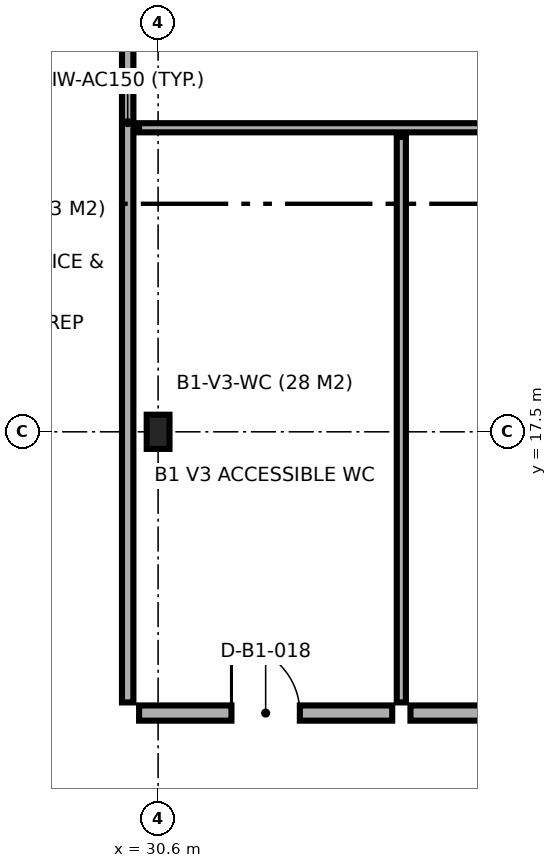
"""IFC4 building model, lengths in metres.
Left out: names, types, materials, properties, quantities, classifications, styles, units other than length and angle.
Written with IfcOpenShell. Run it as: python <this file> out.ifc"""

import sys

from ifc_helpers import new_model, si_unit, direction, frame, frame_2d, origin, origin_2d, place, context, subcontext, project, spatial, rectangle, i_section, extrude, element, fill, save


model = new_model("IFC4")
c1 = context("Model", 3, precision=1e-05, world=origin(), true_north=direction((0.0, 1.0)))
c2 = subcontext(c1, "Body", "Model", "MODEL_VIEW")
j1 = project(units=[si_unit("LENGTHUNIT", "METRE"), si_unit("PLANEANGLEUNIT", "RADIAN")], contexts=[c1])
p1 = place(None, origin())
s1 = spatial("IfcSite", under=j1, at=p1, CompositionType="ELEMENT")
p2 = place(p1, origin())
s2 = spatial("IfcBuilding", under=s1, at=p2, CompositionType="ELEMENT")
p3 = place(p2, frame((0.0, 0.0, -5.0)))
s3 = spatial("IfcBuildingStorey", under=s2, at=p3, CompositionType="ELEMENT", Elevation=-5.0)
p4 = place(p3, frame((30.6, 17.5, 0.0), z_axis=(0.0, 0.0, 1.0), x_axis=(1.0, 0.0, 0.0)))
e1 = element("IfcColumn", 1, at=p4, inside=s3, PredefinedType="COLUMN", context=c2, shape_type="SweptSolid", body=[
    extrude(i_section(OverallWidth=0.3, OverallDepth=0.45, WebThickness=0.014, FlangeThickness=0.026, FilletRadius=0.027, at=origin_2d()), origin(), (0.0, 0.0, 1.0), 5.0),
])
p5 = place(p3, frame((30.35, 21.5, 0.0), z_axis=(0.0, 0.0, 1.0), x_axis=(1.0, 0.0, 0.0)))
e2 = element("IfcWall", 2, at=p5, inside=s3, PredefinedType="PARTITIONING", context=c2, shape_type="SweptSolid", body=[
    extrude(rectangle(XDim=23.845, YDim=0.12, at=frame_2d((11.922, 0.0))), origin(), (0.0, 0.0, 1.0), 4.7),
])
p6 = place(p3, frame((33.8, 13.94, 0.0), z_axis=(0.0, 0.0, 1.0), x_axis=(0.0, 1.0, 0.0)))
e3 = element("IfcWall", 3, at=p6, inside=s3, PredefinedType="PARTITIONING", context=c2, shape_type="SweptSolid", body=[
    extrude(rectangle(XDim=7.44, YDim=0.12, at=frame_2d((3.72, 0.0))), origin(), (0.0, 0.0, 1.0), 4.7),
])
p7 = place(p3, frame((30.35, 13.8, 0.0), z_axis=(0.0, 0.0, 1.0), x_axis=(1.0, 0.0, 0.0)))
e4 = element("IfcWall", 4, at=p7, inside=s3, PredefinedType="SOLIDWALL", context=c2, shape_type="SweptSolid", body=[
    extrude(rectangle(XDim=3.33, YDim=0.2, at=frame_2d((1.665, 0.0))), origin(), (0.0, 0.0, 1.0), 4.7),
])
p8 = place(p7, frame((1.215, 0.0, 0.0)))
e5 = element("IfcOpeningElement", 5, at=p8, cuts=e4, PredefinedType="OPENING", context=c2, shape_type="SweptSolid", body=[
    extrude(rectangle(XDim=0.9, YDim=2.1, at=frame_2d((0.45, 1.05))), frame((0.0, 0.11, 0.0), z_axis=(0.0, -1.0, 0.0), x_axis=(1.0, 0.0, 0.0)), (0.0, 0.0, 1.0), 0.22),
])
p9 = place(p3, frame((33.92, 13.8, 0.0), z_axis=(0.0, 0.0, 1.0), x_axis=(1.0, 0.0, 0.0)))
e6 = element("IfcWall", 6, at=p9, inside=s3, PredefinedType="SOLIDWALL", context=c2, shape_type="SweptSolid", body=[
    extrude(rectangle(XDim=20.275, YDim=0.2, at=frame_2d((10.138, 0.0))), origin(), (0.0, 0.0, 1.0), 4.7),
])
p10 = place(p9, frame((10.381, 0.0, 0.0)))
e7 = element("IfcOpeningElement", 7, at=p10, cuts=e6, PredefinedType="OPENING", context=c2, shape_type="SweptSolid", body=[
    extrude(rectangle(XDim=1.4, YDim=2.2, at=frame_2d((0.7, 1.1))), frame((0.0, 0.11, 0.0), z_axis=(0.0, -1.0, 0.0), x_axis=(1.0, 0.0, 0.0)), (0.0, 0.0, 1.0), 0.22),
])
p11 = place(p3, frame((30.2, 13.94, 0.0), z_axis=(0.0, 0.0, 1.0), x_axis=(0.0, 1.0, 0.0)))
e8 = element("IfcWall", 8, at=p11, inside=s3, PredefinedType="PARTITIONING", context=c2, shape_type="SweptSolid", body=[
    extrude(rectangle(XDim=15.255, YDim=0.15, at=frame_2d((7.627, 0.0))), origin(), (0.0, 0.0, 1.0), 4.7),
])
p12 = place(p11, frame((10.807, 0.0, 0.0)))
e9 = element("IfcOpeningElement", 9, at=p12, cuts=e8, PredefinedType="OPENING", context=c2, shape_type="SweptSolid", body=[
    extrude(rectangle(XDim=1.4, YDim=2.2, at=frame_2d((0.7, 1.1))), frame((0.0, 0.085, 0.0), z_axis=(0.0, -1.0, 0.0), x_axis=(1.0, 0.0, 0.0)), (0.0, 0.0, 1.0), 0.17),
])
p13 = place(p8, origin())
e10 = element("IfcDoor", 10, at=p13, inside=s3, OperationType="SINGLE_SWING_LEFT", PredefinedType="DOOR", context=c2, shape_type="SweptSolid", body=[
    extrude(rectangle(XDim=0.9, YDim=2.1, at=frame_2d((0.45, 1.05))), frame((0.0, 0.025, 0.0), z_axis=(0.0, -1.0, 0.0), x_axis=(1.0, 0.0, 0.0)), (0.0, 0.0, 1.0), 0.05),
])
fill(e5, e10)
save(model, sys.argv[1])
